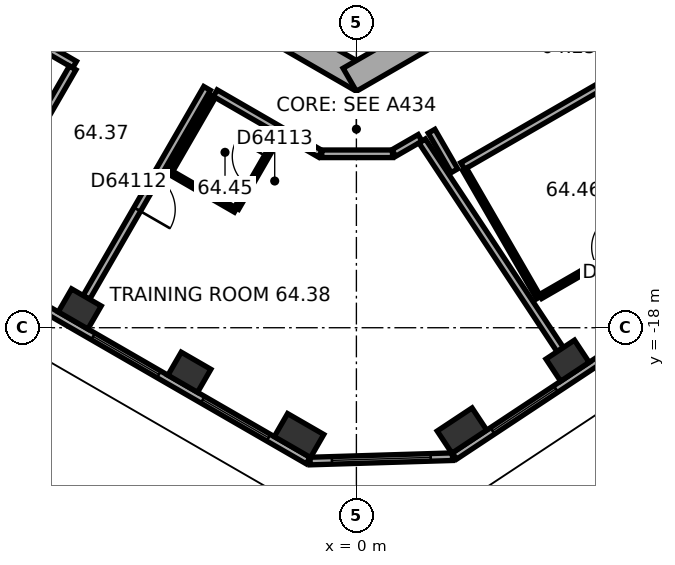
"""IFC4 building model, lengths in metres.
Left out: names, types, materials, properties, quantities, classifications, styles, units other than length and angle.
Written with IfcOpenShell. Run it as: python <this file> out.ifc"""

import sys

from ifc_helpers import new_model, si_unit, direction, frame, frame_2d, origin, origin_2d, place, context, subcontext, project, spatial, rectangle, extrude, element, fill, save


model = new_model("IFC4")
c1 = context("Model", 3, precision=1e-05, world=origin(), true_north=direction((0.0, 1.0)))
c2 = subcontext(c1, "Body", "Model", "MODEL_VIEW")
j1 = project(units=[si_unit("LENGTHUNIT", "METRE"), si_unit("PLANEANGLEUNIT", "RADIAN")], contexts=[c1])
p1 = place(None, origin())
s1 = spatial("IfcSite", under=j1, at=p1, CompositionType="ELEMENT")
p2 = place(p1, origin())
s2 = spatial("IfcBuilding", under=s1, at=p2, CompositionType="ELEMENT")
p3 = place(p2, frame((0.0, 0.0, 259.8)))
s3 = spatial("IfcBuildingStorey", under=s2, at=p3, CompositionType="ELEMENT", Elevation=259.8)
for number, where, z_axis, x_axis in (
    (1, (-7.28, -17.505, 0.0), (0.0, 0.0, 1.0), (0.866, -0.5, 0.0)),
    (2, (-4.395, -19.171, 0.0), (0.0, 0.0, 1.0), (0.866, -0.5, 0.0)),
):
    element("IfcColumn", number, at=place(p3, frame(where, z_axis=z_axis, x_axis=x_axis)), inside=s3, PredefinedType="COLUMN", context=c2, shape_type="SweptSolid", body=[
        extrude(rectangle(XDim=0.9, YDim=0.7, at=origin_2d()), origin(), (0.0, 0.0, 1.0), 3.7),
    ])
for number, where, z_axis, x_axis in (
    (3, (-1.509, -20.837, 0.0), (0.0, 0.0, 1.0), (0.866, -0.5, 0.0)),
    (4, (2.778, -20.706, 0.0), (0.0, 0.0, 1.0), (0.834, 0.552, 0.0)),
):
    element("IfcColumn", number, at=place(p3, frame(where, z_axis=z_axis, x_axis=x_axis)), inside=s3, PredefinedType="COLUMN", context=c2, shape_type="SweptSolid", body=[
        extrude(rectangle(XDim=1.1, YDim=0.7, at=origin_2d()), origin(), (0.0, 0.0, 1.0), 3.7),
    ])
p4 = place(p3, frame((5.557, -18.867, 0.0), z_axis=(0.0, 0.0, 1.0), x_axis=(0.833885822067, 0.551936985312, 0.0)))
e5 = element("IfcColumn", 5, at=p4, inside=s3, PredefinedType="COLUMN", context=c2, shape_type="SweptSolid", body=[
    extrude(rectangle(XDim=0.9, YDim=0.7, at=origin_2d()), origin(), (0.0, 0.0, 1.0), 3.7),
])
p5 = place(p3, frame((-10.025, -5.586, 0.0), z_axis=(0.0, 0.0, 1.0), x_axis=(0.866026453023, -0.499998182661, 0.0)))
e6 = element("IfcWall", 6, at=p5, inside=s3, PredefinedType="SHEAR", context=c2, shape_type="SweptSolid", body=[
    extrude(rectangle(XDim=11.778, YDim=0.7, at=frame_2d((5.889, 0.0))), origin(), (0.0, 0.0, 1.0), 3.7),
])
p6 = place(p5, frame((6.089, 0.0, 0.0)))
e7 = element("IfcOpeningElement", 7, at=p6, cuts=e6, PredefinedType="OPENING", context=c2, shape_type="SweptSolid", body=[
    extrude(rectangle(XDim=1.5, YDim=2.1, at=frame_2d((0.75, 1.05))), frame((0.0, 0.36, 0.0), z_axis=(0.0, -1.0, 0.0), x_axis=(1.0, 0.0, 0.0)), (0.0, 0.0, 1.0), 0.72),
])
p7 = place(p5, frame((1.539, 0.0, 0.0)))
e8 = element("IfcOpeningElement", 8, at=p7, cuts=e6, PredefinedType="OPENING", context=c2, shape_type="SweptSolid", body=[
    extrude(rectangle(XDim=1.1, YDim=2.1, at=frame_2d((0.55, 1.05))), frame((0.0, 0.36, 0.0), z_axis=(0.0, -1.0, 0.0), x_axis=(1.0, 0.0, 0.0)), (0.0, 0.0, 1.0), 0.72),
])
p8 = place(p5, frame((4.139, 0.0, 0.0)))
e9 = element("IfcOpeningElement", 9, at=p8, cuts=e6, PredefinedType="OPENING", context=c2, shape_type="SweptSolid", body=[
    extrude(rectangle(XDim=1.1, YDim=2.1, at=frame_2d((0.55, 1.05))), frame((0.0, 0.36, 0.0), z_axis=(0.0, -1.0, 0.0), x_axis=(1.0, 0.0, 0.0)), (0.0, 0.0, 1.0), 0.72),
])
p9 = place(p3, frame((-0.175, -11.475, 0.0), z_axis=(0.0, 0.0, 1.0), x_axis=(0.866026453023, 0.499998182661, 0.0)))
e10 = element("IfcWall", 10, at=p9, inside=s3, PredefinedType="SHEAR", context=c2, shape_type="SweptSolid", body=[
    extrude(rectangle(XDim=11.778, YDim=0.7, at=frame_2d((5.889, 0.0))), origin(), (0.0, 0.0, 1.0), 3.7),
])
p10 = place(p9, frame((2.439, 0.0, 0.0)))
e11 = element("IfcOpeningElement", 11, at=p10, cuts=e10, PredefinedType="OPENING", context=c2, shape_type="SweptSolid", body=[
    extrude(rectangle(XDim=1.1, YDim=2.1, at=frame_2d((0.55, 1.05))), frame((0.0, 0.36, 0.0), z_axis=(0.0, -1.0, 0.0), x_axis=(1.0, 0.0, 0.0)), (0.0, 0.0, 1.0), 0.72),
])
p11 = place(p9, frame((5.039, 0.0, 0.0)))
e12 = element("IfcOpeningElement", 12, at=p11, cuts=e10, PredefinedType="OPENING", context=c2, shape_type="SweptSolid", body=[
    extrude(rectangle(XDim=1.1, YDim=2.1, at=frame_2d((0.55, 1.05))), frame((0.0, 0.36, 0.0), z_axis=(0.0, -1.0, 0.0), x_axis=(1.0, 0.0, 0.0)), (0.0, 0.0, 1.0), 0.72),
])
p12 = place(p9, frame((7.639, 0.0, 0.0)))
e13 = element("IfcOpeningElement", 13, at=p12, cuts=e10, PredefinedType="OPENING", context=c2, shape_type="SweptSolid", body=[
    extrude(rectangle(XDim=1.1, YDim=2.1, at=frame_2d((0.55, 1.05))), frame((0.0, 0.36, 0.0), z_axis=(0.0, -1.0, 0.0), x_axis=(1.0, 0.0, 0.0)), (0.0, 0.0, 1.0), 0.72),
])
p13 = place(p3, frame((-16.626, -12.629, 0.0), z_axis=(0.0, 0.0, 1.0), x_axis=(0.866026460444, -0.499998169808, 0.0)))
e14 = element("IfcWall", 14, at=p13, inside=s3, PredefinedType="STANDARD", context=c2, shape_type="SweptSolid", body=[
    extrude(rectangle(XDim=17.731, YDim=0.2, at=frame_2d((8.866, 0.0))), origin(), (0.0, 0.0, 1.0), 3.7),
])
p14 = place(p13, frame((1.203, 0.0, 0.9)))
e15 = element("IfcOpeningElement", 15, at=p14, cuts=e14, PredefinedType="OPENING", context=c2, shape_type="SweptSolid", body=[
    extrude(rectangle(XDim=2.0, YDim=2.0, at=frame_2d((1.0, 1.0))), frame((0.0, 0.11, 0.0), z_axis=(0.0, -1.0, 0.0), x_axis=(1.0, 0.0, 0.0)), (0.0, 0.0, 1.0), 0.22),
])
p15 = place(p13, frame((4.535, 0.0, 0.9)))
e16 = element("IfcOpeningElement", 16, at=p15, cuts=e14, PredefinedType="OPENING", context=c2, shape_type="SweptSolid", body=[
    extrude(rectangle(XDim=2.0, YDim=2.0, at=frame_2d((1.0, 1.0))), frame((0.0, 0.11, 0.0), z_axis=(0.0, -1.0, 0.0), x_axis=(1.0, 0.0, 0.0)), (0.0, 0.0, 1.0), 0.22),
])
p16 = place(p13, frame((7.867, 0.0, 0.9)))
e17 = element("IfcOpeningElement", 17, at=p16, cuts=e14, PredefinedType="OPENING", context=c2, shape_type="SweptSolid", body=[
    extrude(rectangle(XDim=2.0, YDim=2.0, at=frame_2d((1.0, 1.0))), frame((0.0, 0.11, 0.0), z_axis=(0.0, -1.0, 0.0), x_axis=(1.0, 0.0, 0.0)), (0.0, 0.0, 1.0), 0.22),
])
p17 = place(p13, frame((11.198, 0.0, 0.9)))
e18 = element("IfcOpeningElement", 18, at=p17, cuts=e14, PredefinedType="OPENING", context=c2, shape_type="SweptSolid", body=[
    extrude(rectangle(XDim=2.0, YDim=2.0, at=frame_2d((1.0, 1.0))), frame((0.0, 0.11, 0.0), z_axis=(0.0, -1.0, 0.0), x_axis=(1.0, 0.0, 0.0)), (0.0, 0.0, 1.0), 0.22),
])
p18 = place(p13, frame((14.53, 0.0, 0.9)))
e19 = element("IfcOpeningElement", 19, at=p18, cuts=e14, PredefinedType="OPENING", context=c2, shape_type="SweptSolid", body=[
    extrude(rectangle(XDim=2.0, YDim=2.0, at=frame_2d((1.0, 1.0))), frame((0.0, 0.11, 0.0), z_axis=(0.0, -1.0, 0.0), x_axis=(1.0, 0.0, 0.0)), (0.0, 0.0, 1.0), 0.22),
])
p19 = place(p3, frame((-1.217, -21.508, 0.0), z_axis=(0.0, 0.0, 1.0), x_axis=(0.99953295295, 0.030559384285, 0.0)))
e20 = element("IfcWall", 20, at=p19, inside=s3, PredefinedType="STANDARD", context=c2, shape_type="SweptSolid", body=[
    extrude(rectangle(XDim=3.747, YDim=0.2, at=frame_2d((1.874, 0.0))), origin(), (0.0, 0.0, 1.0), 3.7),
])
p20 = place(p19, frame((0.573, 0.0, 0.9)))
e21 = element("IfcOpeningElement", 21, at=p20, cuts=e20, PredefinedType="OPENING", context=c2, shape_type="SweptSolid", body=[
    extrude(rectangle(XDim=2.6, YDim=2.0, at=frame_2d((1.3, 1.0))), frame((0.0, 0.11, 0.0), z_axis=(0.0, -1.0, 0.0), x_axis=(1.0, 0.0, 0.0)), (0.0, 0.0, 1.0), 0.22),
])
p21 = place(p3, frame((2.58, -21.377, 0.0), z_axis=(0.0, 0.0, 1.0), x_axis=(0.833888592176, 0.551932800112, 0.0)))
e22 = element("IfcWall", 22, at=p21, inside=s3, PredefinedType="STANDARD", context=c2, shape_type="SweptSolid", body=[
    extrude(rectangle(XDim=17.731, YDim=0.2, at=frame_2d((8.866, 0.0))), origin(), (0.0, 0.0, 1.0), 3.7),
])
p22 = place(p21, frame((1.202, 0.0, 0.9)))
e23 = element("IfcOpeningElement", 23, at=p22, cuts=e22, PredefinedType="OPENING", context=c2, shape_type="SweptSolid", body=[
    extrude(rectangle(XDim=2.0, YDim=2.0, at=frame_2d((1.0, 1.0))), frame((0.0, 0.11, 0.0), z_axis=(0.0, -1.0, 0.0), x_axis=(1.0, 0.0, 0.0)), (0.0, 0.0, 1.0), 0.22),
])
p23 = place(p21, frame((4.533, 0.0, 0.9)))
e24 = element("IfcOpeningElement", 24, at=p23, cuts=e22, PredefinedType="OPENING", context=c2, shape_type="SweptSolid", body=[
    extrude(rectangle(XDim=2.0, YDim=2.0, at=frame_2d((1.0, 1.0))), frame((0.0, 0.11, 0.0), z_axis=(0.0, -1.0, 0.0), x_axis=(1.0, 0.0, 0.0)), (0.0, 0.0, 1.0), 0.22),
])
p24 = place(p21, frame((7.865, 0.0, 0.9)))
e25 = element("IfcOpeningElement", 25, at=p24, cuts=e22, PredefinedType="OPENING", context=c2, shape_type="SweptSolid", body=[
    extrude(rectangle(XDim=2.0, YDim=2.0, at=frame_2d((1.0, 1.0))), frame((0.0, 0.11, 0.0), z_axis=(0.0, -1.0, 0.0), x_axis=(1.0, 0.0, 0.0)), (0.0, 0.0, 1.0), 0.22),
])
p25 = place(p21, frame((11.197, 0.0, 0.9)))
e26 = element("IfcOpeningElement", 26, at=p25, cuts=e22, PredefinedType="OPENING", context=c2, shape_type="SweptSolid", body=[
    extrude(rectangle(XDim=2.0, YDim=2.0, at=frame_2d((1.0, 1.0))), frame((0.0, 0.11, 0.0), z_axis=(0.0, -1.0, 0.0), x_axis=(1.0, 0.0, 0.0)), (0.0, 0.0, 1.0), 0.22),
])
p26 = place(p21, frame((14.528, 0.0, 0.9)))
e27 = element("IfcOpeningElement", 27, at=p26, cuts=e22, PredefinedType="OPENING", context=c2, shape_type="SweptSolid", body=[
    extrude(rectangle(XDim=2.0, YDim=2.0, at=frame_2d((1.0, 1.0))), frame((0.0, 0.11, 0.0), z_axis=(0.0, -1.0, 0.0), x_axis=(1.0, 0.0, 0.0)), (0.0, 0.0, 1.0), 0.22),
])
p27 = place(p3, frame((-11.501, -8.719, 0.0), z_axis=(0.0, 0.0, 1.0), x_axis=(0.866024434742, -0.500001678427, 0.0)))
e28 = element("IfcWall", 28, at=p27, inside=s3, PredefinedType="PARTITIONING", context=c2, shape_type="SweptSolid", body=[
    extrude(rectangle(XDim=4.718, YDim=0.2, at=frame_2d((2.359, 0.0))), origin(), (0.0, 0.0, 1.0), 3.42),
])
p28 = place(p3, frame((-9.99, -15.537, 0.0), z_axis=(0.0, 0.0, 1.0), x_axis=(0.499966611936, 0.866044679534, 0.0)))
e29 = element("IfcWall", 29, at=p28, inside=s3, PredefinedType="PARTITIONING", context=c2, shape_type="SweptSolid", body=[
    extrude(rectangle(XDim=5.049, YDim=0.2, at=frame_2d((2.524, 0.0))), origin(), (0.0, 0.0, 1.0), 2.87),
])
p29 = place(p28, frame((2.024, 0.0, 0.0)))
e30 = element("IfcOpeningElement", 30, at=p29, cuts=e29, PredefinedType="OPENING", context=c2, shape_type="SweptSolid", body=[
    extrude(rectangle(XDim=1.0, YDim=2.1, at=frame_2d((0.5, 1.05))), frame((0.0, 0.11, 0.0), z_axis=(0.0, -1.0, 0.0), x_axis=(1.0, 0.0, 0.0)), (0.0, 0.0, 1.0), 0.22),
])
p30 = place(p3, frame((-7.105, -17.202, 0.0), z_axis=(0.0, 0.0, 1.0), x_axis=(0.499988692146, 0.866031932279, 0.0)))
e31 = element("IfcWall", 31, at=p30, inside=s3, PredefinedType="PARTITIONING", context=c2, shape_type="SweptSolid", body=[
    extrude(rectangle(XDim=6.35, YDim=0.2, at=frame_2d((3.175, 0.0))), origin(), (0.0, 0.0, 1.0), 3.42),
])
p31 = place(p30, frame((2.675, 0.0, 0.0)))
e32 = element("IfcOpeningElement", 32, at=p31, cuts=e31, PredefinedType="OPENING", context=c2, shape_type="SweptSolid", body=[
    extrude(rectangle(XDim=1.0, YDim=2.1, at=frame_2d((0.5, 1.05))), frame((0.0, 0.11, 0.0), z_axis=(0.0, -1.0, 0.0), x_axis=(1.0, 0.0, 0.0)), (0.0, 0.0, 1.0), 0.22),
])
p32 = place(p3, frame((-4.913, -13.906, 0.0), z_axis=(0.0, 0.0, 1.0), x_axis=(0.500031774688, 0.866007057882, 0.0)))
e33 = element("IfcWall", 33, at=p32, inside=s3, PredefinedType="PARTITIONING", context=c2, shape_type="SweptSolid", body=[
    extrude(rectangle(XDim=2.3, YDim=0.12, at=frame_2d((1.15, 0.0))), origin(), (0.0, 0.0, 1.0), 3.42),
])
p33 = place(p3, frame((-3.713, -11.828, 0.0), z_axis=(0.0, 0.0, 1.0), x_axis=(0.866026321388, -0.499998410661, 0.0)))
e34 = element("IfcWall", 34, at=p33, inside=s3, PredefinedType="PARTITIONING", context=c2, shape_type="SweptSolid", body=[
    extrude(rectangle(XDim=3.191, YDim=0.2, at=frame_2d((1.595, 0.0))), origin(), (0.0, 0.0, 1.0), 3.42),
])
p34 = place(p3, frame((-3.181, -14.906, 0.0), z_axis=(0.0, 0.0, 1.0), x_axis=(-0.866043088465, 0.499969367985, 0.0)))
e35 = element("IfcWall", 35, at=p34, inside=s3, PredefinedType="PARTITIONING", context=c2, shape_type="SweptSolid", body=[
    extrude(rectangle(XDim=1.94, YDim=0.12, at=frame_2d((0.97, 0.0))), origin(), (0.0, 0.0, 1.0), 3.42),
])
p35 = place(p3, frame((-2.031, -12.915, 0.0), z_axis=(0.0, 0.0, 1.0), x_axis=(-0.49994888933, -0.866054910533, 0.0)))
e36 = element("IfcWall", 36, at=p35, inside=s3, PredefinedType="PARTITIONING", context=c2, shape_type="SweptSolid", body=[
    extrude(rectangle(XDim=2.24, YDim=0.12, at=frame_2d((1.12, 0.0))), origin(), (0.0, 0.0, 1.0), 3.42),
])
p36 = place(p35, frame((0.67, 0.0, 0.0)))
e37 = element("IfcOpeningElement", 37, at=p36, cuts=e36, PredefinedType="OPENING", context=c2, shape_type="SweptSolid", body=[
    extrude(rectangle(XDim=0.9, YDim=2.1, at=frame_2d((0.45, 1.05))), frame((0.0, 0.07, 0.0), z_axis=(0.0, -1.0, 0.0), x_axis=(1.0, 0.0, 0.0)), (0.0, 0.0, 1.0), 0.14),
])
p37 = place(p3, frame((-0.91, -13.423, 0.0), z_axis=(0.0, 0.0, 1.0), x_axis=(1.0, 0.0, 0.0)))
e38 = element("IfcWall", 38, at=p37, inside=s3, PredefinedType="PARTITIONING", context=c2, shape_type="SweptSolid", body=[
    extrude(rectangle(XDim=1.86, YDim=0.2, at=frame_2d((0.93, 0.0))), origin(), (0.0, 0.0, 1.0), 3.42),
])
p38 = place(p3, frame((0.985, -13.403, 0.0), z_axis=(0.0, 0.0, 1.0), x_axis=(0.866032814021, 0.499987164874, 0.0)))
e39 = element("IfcWall", 39, at=p38, inside=s3, PredefinedType="PARTITIONING", context=c2, shape_type="SweptSolid", body=[
    extrude(rectangle(XDim=0.798, YDim=0.2, at=frame_2d((0.399, 0.0))), origin(), (0.0, 0.0, 1.0), 3.42),
])
p39 = place(p3, frame((1.979, -12.829, 0.0), z_axis=(0.0, 0.0, 1.0), x_axis=(0.500074377092, -0.865982457891, 0.0)))
e40 = element("IfcWall", 40, at=p39, inside=s3, PredefinedType="PARTITIONING", context=c2, shape_type="SweptSolid", body=[
    extrude(rectangle(XDim=1.201, YDim=0.2, at=frame_2d((0.601, 0.0))), origin(), (0.0, 0.0, 1.0), 3.42),
])
p40 = place(p3, frame((2.796, -13.744, 0.0), z_axis=(0.0, 0.0, 1.0), x_axis=(0.866018331238, 0.50001224981, 0.0)))
e41 = element("IfcWall", 41, at=p40, inside=s3, PredefinedType="PARTITIONING", context=c2, shape_type="SweptSolid", body=[
    extrude(rectangle(XDim=4.4, YDim=0.2, at=frame_2d((2.2, 0.0))), origin(), (0.0, 0.0, 1.0), 3.42),
])
p41 = place(p3, frame((4.796, -17.208, 0.0), z_axis=(0.0, 0.0, 1.0), x_axis=(-0.500043961785, 0.866000020948, 0.0)))
e42 = element("IfcWall", 42, at=p41, inside=s3, PredefinedType="PARTITIONING", context=c2, shape_type="SweptSolid", body=[
    extrude(rectangle(XDim=3.9, YDim=0.12, at=frame_2d((1.95, 0.0))), origin(), (0.0, 0.0, 1.0), 3.42),
])
p42 = place(p3, frame((5.364, -18.575, 0.0), z_axis=(0.0, 0.0, 1.0), x_axis=(-0.55195757761, 0.833872191957, 0.0)))
e43 = element("IfcWall", 43, at=p42, inside=s3, PredefinedType="PARTITIONING", context=c2, shape_type="SweptSolid", body=[
    extrude(rectangle(XDim=6.581, YDim=0.2, at=frame_2d((3.291, 0.0))), origin(), (0.0, 0.0, 1.0), 3.42),
])
p43 = place(p3, frame((8.554, -15.039, 0.0), z_axis=(0.0, 0.0, 1.0), x_axis=(-0.865994635417, -0.500053288589, 0.0)))
e44 = element("IfcWall", 44, at=p43, inside=s3, PredefinedType="PARTITIONING", context=c2, shape_type="SweptSolid", body=[
    extrude(rectangle(XDim=4.28, YDim=0.12, at=frame_2d((2.14, 0.0))), origin(), (0.0, 0.0, 1.0), 3.42),
])
p44 = place(p43, frame((1.69, 0.0, 0.0)))
e45 = element("IfcOpeningElement", 45, at=p44, cuts=e44, PredefinedType="OPENING", context=c2, shape_type="SweptSolid", body=[
    extrude(rectangle(XDim=0.9, YDim=2.1, at=frame_2d((0.45, 1.05))), frame((0.0, 0.07, 0.0), z_axis=(0.0, -1.0, 0.0), x_axis=(1.0, 0.0, 0.0)), (0.0, 0.0, 1.0), 0.14),
])
p45 = place(p17, origin())
e46 = element("IfcWindow", 46, at=p45, inside=s3, PartitioningType="SINGLE_PANEL", PredefinedType="WINDOW", context=c2, shape_type="SweptSolid", body=[
    extrude(rectangle(XDim=2.0, YDim=2.0, at=frame_2d((1.0, 1.0))), frame((0.0, 0.03, 0.0), z_axis=(0.0, -1.0, 0.0), x_axis=(1.0, 0.0, 0.0)), (0.0, 0.0, 1.0), 0.06),
])
fill(e18, e46)
p46 = place(p18, origin())
e47 = element("IfcWindow", 47, at=p46, inside=s3, PartitioningType="SINGLE_PANEL", PredefinedType="WINDOW", context=c2, shape_type="SweptSolid", body=[
    extrude(rectangle(XDim=2.0, YDim=2.0, at=frame_2d((1.0, 1.0))), frame((0.0, 0.03, 0.0), z_axis=(0.0, -1.0, 0.0), x_axis=(1.0, 0.0, 0.0)), (0.0, 0.0, 1.0), 0.06),
])
fill(e19, e47)
p47 = place(p20, origin())
e48 = element("IfcWindow", 48, at=p47, inside=s3, PartitioningType="SINGLE_PANEL", PredefinedType="WINDOW", context=c2, shape_type="SweptSolid", body=[
    extrude(rectangle(XDim=2.6, YDim=2.0, at=frame_2d((1.3, 1.0))), frame((0.0, 0.03, 0.0), z_axis=(0.0, -1.0, 0.0), x_axis=(1.0, 0.0, 0.0)), (0.0, 0.0, 1.0), 0.06),
])
fill(e21, e48)
p48 = place(p22, origin())
e49 = element("IfcWindow", 49, at=p48, inside=s3, PartitioningType="SINGLE_PANEL", PredefinedType="WINDOW", context=c2, shape_type="SweptSolid", body=[
    extrude(rectangle(XDim=2.0, YDim=2.0, at=frame_2d((1.0, 1.0))), frame((0.0, 0.03, 0.0), z_axis=(0.0, -1.0, 0.0), x_axis=(1.0, 0.0, 0.0)), (0.0, 0.0, 1.0), 0.06),
])
fill(e23, e49)
p49 = place(p31, origin())
e50 = element("IfcDoor", 50, at=p49, inside=s3, OperationType="SINGLE_SWING_LEFT", PredefinedType="DOOR", context=c2, shape_type="SweptSolid", body=[
    extrude(rectangle(XDim=1.0, YDim=2.1, at=frame_2d((0.5, 1.05))), frame((0.0, 0.025, 0.0), z_axis=(0.0, -1.0, 0.0), x_axis=(1.0, 0.0, 0.0)), (0.0, 0.0, 1.0), 0.05),
])
fill(e32, e50)
p50 = place(p36, origin())
e51 = element("IfcDoor", 51, at=p50, inside=s3, OperationType="SINGLE_SWING_LEFT", PredefinedType="DOOR", context=c2, shape_type="SweptSolid", body=[
    extrude(rectangle(XDim=0.9, YDim=2.1, at=frame_2d((0.45, 1.05))), frame((0.0, 0.025, 0.0), z_axis=(0.0, -1.0, 0.0), x_axis=(1.0, 0.0, 0.0)), (0.0, 0.0, 1.0), 0.05),
])
fill(e37, e51)
save(model, sys.argv[1])
